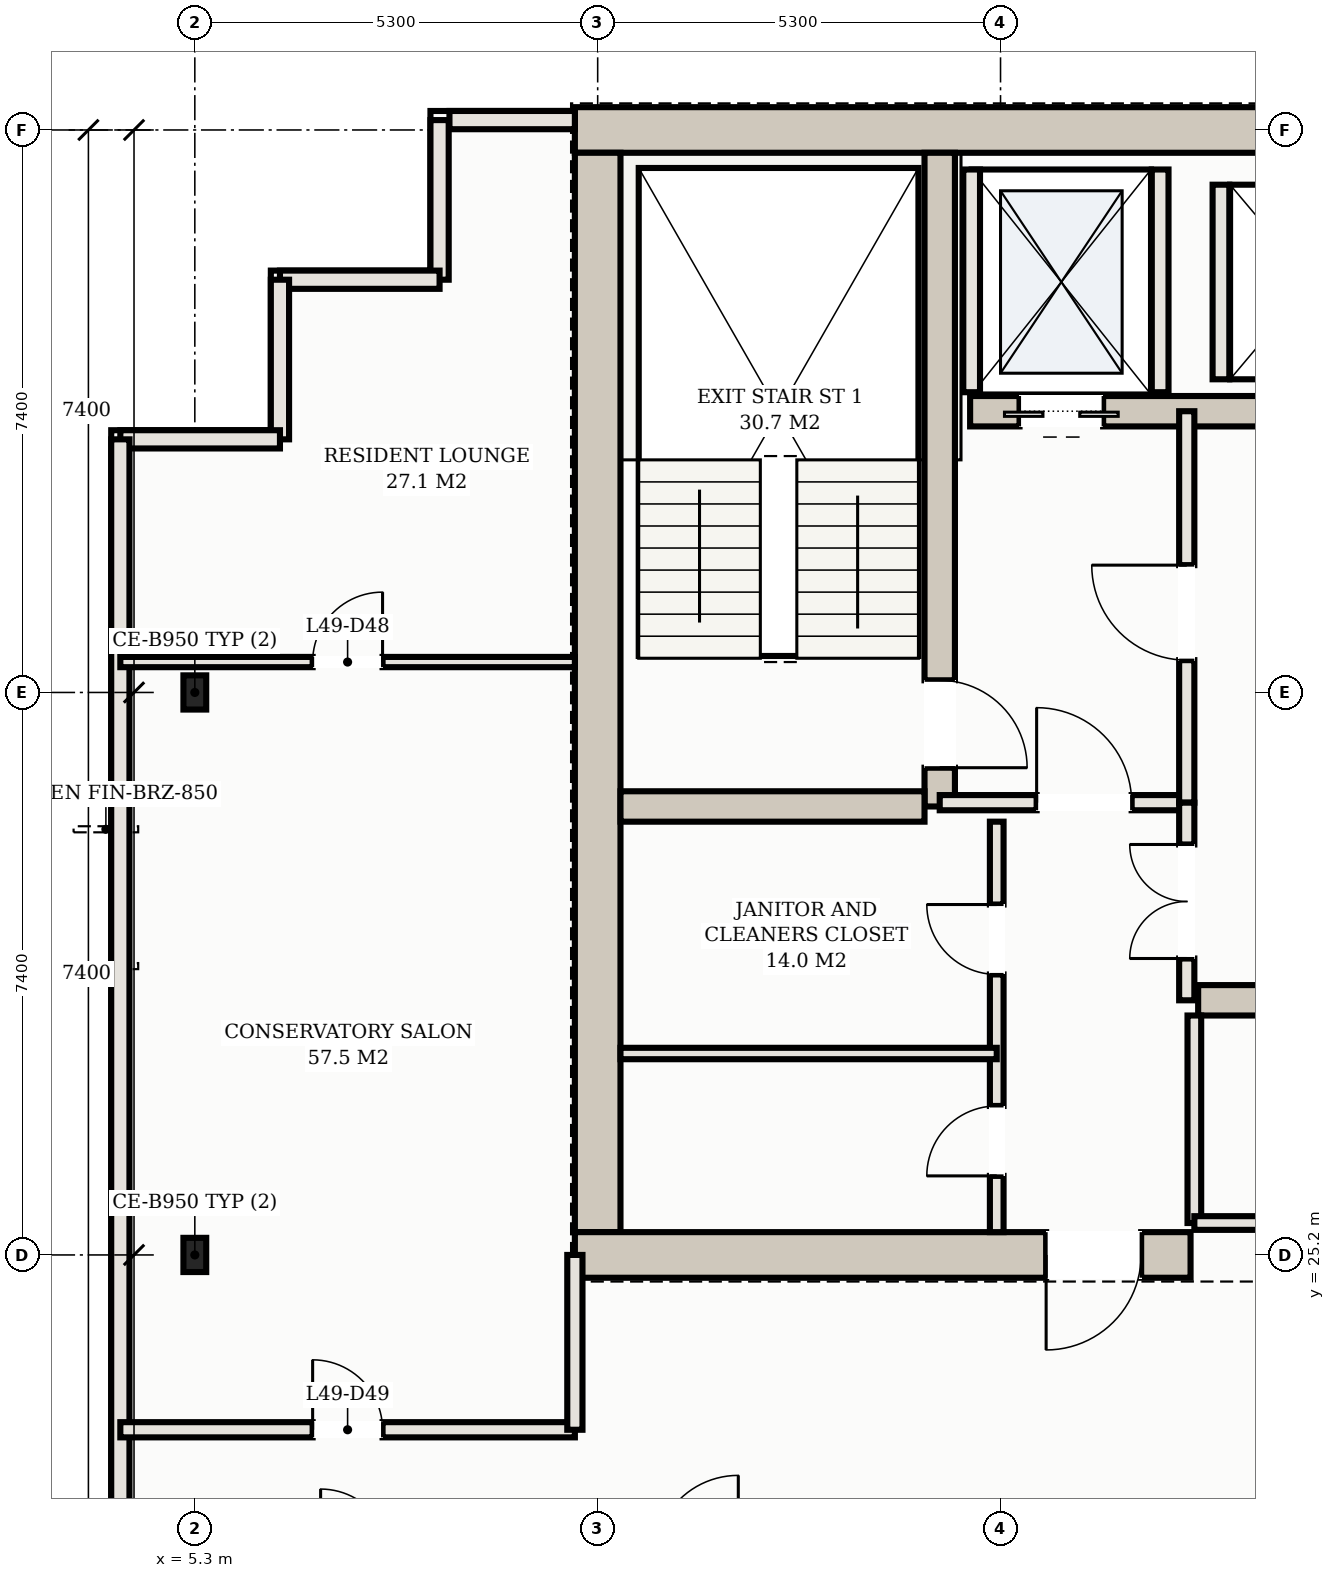
"""IFC4 building model, lengths in metres.
Left out: names, types, materials, properties, quantities, classifications, styles, units other than length and angle.
Written with IfcOpenShell. Run it as: python <this file> out.ifc"""

import sys

from ifc_helpers import new_model, si_unit, direction, frame, frame_2d, origin, origin_2d, place, context, subcontext, project, spatial, rectangle, hollow_rectangle, extrude, element, fill, save


model = new_model("IFC4")
c1 = context("Model", 3, precision=1e-05, world=origin(), true_north=direction((0.0, 1.0)))
c2 = subcontext(c1, "Body", "Model", "MODEL_VIEW")
j1 = project(units=[si_unit("LENGTHUNIT", "METRE"), si_unit("PLANEANGLEUNIT", "RADIAN")], contexts=[c1])
p1 = place(None, origin())
s1 = spatial("IfcSite", under=j1, at=p1, CompositionType="ELEMENT")
p2 = place(p1, origin())
s2 = spatial("IfcBuilding", under=s1, at=p2, CompositionType="ELEMENT")
p3 = place(p2, frame((0.0, 0.0, 178.8)))
s3 = spatial("IfcBuildingStorey", under=s2, at=p3, CompositionType="ELEMENT", Elevation=178.8)
p4 = place(p3, frame((10.3, 40.0, 0.0), z_axis=(0.0, 0.0, 1.0), x_axis=(1.0, 0.0, 0.0)))
e1 = element("IfcWall", 1, at=p4, inside=s3, PredefinedType="SHEAR", context=c2, shape_type="SweptSolid", body=[
    extrude(rectangle(XDim=32.4, YDim=0.6, at=frame_2d((16.2, 0.0))), origin(), (0.0, 0.0, 1.0), 3.1),
])
p5 = place(p3, frame((10.6, 25.5, 0.0), z_axis=(0.0, 0.0, 1.0), x_axis=(0.0, 1.0, 0.0)))
e2 = element("IfcWall", 2, at=p5, inside=s3, PredefinedType="SHEAR", context=c2, shape_type="SweptSolid", body=[
    extrude(rectangle(XDim=14.2, YDim=0.6, at=frame_2d((7.1, 0.0))), origin(), (0.0, 0.0, 1.0), 3.1),
])
p6 = place(p3, frame((10.3, 25.2, 0.0), z_axis=(0.0, 0.0, 1.0), x_axis=(1.0, 0.0, 0.0)))
e3 = element("IfcWall", 3, at=p6, inside=s3, PredefinedType="SHEAR", context=c2, shape_type="SweptSolid", body=[
    extrude(rectangle(XDim=8.1, YDim=0.6, at=frame_2d((4.05, 0.0))), origin(), (0.0, 0.0, 1.0), 3.1),
])
p7 = place(p6, frame((6.2, 0.0, 0.0)))
e4 = element("IfcOpeningElement", 4, at=p7, cuts=e3, PredefinedType="OPENING", context=c2, shape_type="SweptSolid", body=[
    extrude(rectangle(XDim=1.25, YDim=2.2, at=frame_2d((0.625, 1.1))), frame((0.0, 0.31, 0.0), z_axis=(0.0, -1.0, 0.0), x_axis=(1.0, 0.0, 0.0)), (0.0, 0.0, 1.0), 0.62),
])
p8 = place(p3, frame((15.1, 31.1, 0.0), z_axis=(0.0, 0.0, 1.0), x_axis=(0.0, 1.0, 0.0)))
e5 = element("IfcWall", 5, at=p8, inside=s3, PredefinedType="SHEAR", context=c2, shape_type="SweptSolid", body=[
    extrude(rectangle(XDim=8.6, YDim=0.4, at=frame_2d((4.3, 0.0))), origin(), (0.0, 0.0, 1.0), 3.1),
])
p9 = place(p8, frame((0.51, 0.0, 0.0)))
e6 = element("IfcOpeningElement", 6, at=p9, cuts=e5, PredefinedType="OPENING", context=c2, shape_type="SweptSolid", body=[
    extrude(rectangle(XDim=1.15, YDim=2.2, at=frame_2d((0.575, 1.1))), frame((0.0, 0.21, 0.0), z_axis=(0.0, -1.0, 0.0), x_axis=(1.0, 0.0, 0.0)), (0.0, 0.0, 1.0), 0.42),
])
p10 = place(p3, frame((10.9, 31.1, 0.0), z_axis=(0.0, 0.0, 1.0), x_axis=(1.0, 0.0, 0.0)))
e7 = element("IfcWall", 7, at=p10, inside=s3, PredefinedType="SHEAR", context=c2, shape_type="SweptSolid", body=[
    extrude(rectangle(XDim=4.0, YDim=0.4, at=frame_2d((2.0, 0.0))), origin(), (0.0, 0.0, 1.0), 3.1),
])
p11 = place(p3, frame((15.5, 36.3, 0.0), z_axis=(0.0, 0.0, 1.0), x_axis=(1.0, 0.0, 0.0)))
e8 = element("IfcWall", 8, at=p11, inside=s3, PredefinedType="SHEAR", context=c2, shape_type="SweptSolid", body=[
    extrude(rectangle(XDim=22.0, YDim=0.4, at=frame_2d((11.0, 0.0))), origin(), (0.0, 0.0, 1.0), 3.1),
])
p12 = place(p11, frame((0.65, 0.0, 0.0)))
e9 = element("IfcOpeningElement", 9, at=p12, cuts=e8, PredefinedType="OPENING", context=c2, shape_type="SweptSolid", body=[
    extrude(rectangle(XDim=1.1, YDim=2.15, at=frame_2d((0.55, 1.075))), frame((0.0, 0.21, 0.0), z_axis=(0.0, -1.0, 0.0), x_axis=(1.0, 0.0, 0.0)), (0.0, 0.0, 1.0), 0.42),
])
p13 = place(p11, frame((20.25, 0.0, 0.0)))
e10 = element("IfcOpeningElement", 10, at=p13, cuts=e8, PredefinedType="OPENING", context=c2, shape_type="SweptSolid", body=[
    extrude(rectangle(XDim=1.1, YDim=2.15, at=frame_2d((0.55, 1.075))), frame((0.0, 0.21, 0.0), z_axis=(0.0, -1.0, 0.0), x_axis=(1.0, 0.0, 0.0)), (0.0, 0.0, 1.0), 0.42),
])
p14 = place(p11, frame((17.05, 0.0, 0.0)))
e11 = element("IfcOpeningElement", 11, at=p14, cuts=e8, PredefinedType="OPENING", context=c2, shape_type="SweptSolid", body=[
    extrude(rectangle(XDim=1.3, YDim=2.2, at=frame_2d((0.65, 1.1))), frame((0.0, 0.21, 0.0), z_axis=(0.0, -1.0, 0.0), x_axis=(1.0, 0.0, 0.0)), (0.0, 0.0, 1.0), 0.42),
])
p15 = place(p3, frame((18.5, 28.55, 0.0), z_axis=(0.0, 0.0, 1.0), x_axis=(1.0, 0.0, 0.0)))
e12 = element("IfcWall", 12, at=p15, inside=s3, PredefinedType="SHEAR", context=c2, shape_type="SweptSolid", body=[
    extrude(rectangle(XDim=16.0, YDim=0.4, at=frame_2d((8.0, 0.0))), origin(), (0.0, 0.0, 1.0), 3.1),
])
p16 = place(p15, frame((8.95, 0.0, 0.0)))
e13 = element("IfcOpeningElement", 13, at=p16, cuts=e12, PredefinedType="OPENING", context=c2, shape_type="SweptSolid", body=[
    extrude(rectangle(XDim=1.1, YDim=2.15, at=frame_2d((0.55, 1.075))), frame((0.0, 0.21, 0.0), z_axis=(0.0, -1.0, 0.0), x_axis=(1.0, 0.0, 0.0)), (0.0, 0.0, 1.0), 0.42),
])
p17 = place(p15, frame((11.55, 0.0, 0.0)))
e14 = element("IfcOpeningElement", 14, at=p17, cuts=e12, PredefinedType="OPENING", context=c2, shape_type="SweptSolid", body=[
    extrude(rectangle(XDim=1.1, YDim=2.15, at=frame_2d((0.55, 1.075))), frame((0.0, 0.21, 0.0), z_axis=(0.0, -1.0, 0.0), x_axis=(1.0, 0.0, 0.0)), (0.0, 0.0, 1.0), 0.42),
])
p18 = place(p15, frame((14.15, 0.0, 0.0)))
e15 = element("IfcOpeningElement", 15, at=p18, cuts=e12, PredefinedType="OPENING", context=c2, shape_type="SweptSolid", body=[
    extrude(rectangle(XDim=1.1, YDim=2.15, at=frame_2d((0.55, 1.075))), frame((0.0, 0.21, 0.0), z_axis=(0.0, -1.0, 0.0), x_axis=(1.0, 0.0, 0.0)), (0.0, 0.0, 1.0), 0.42),
])
for number, where, z_axis, x_axis in (
    (16, (5.3, 25.2, 0.0), (0.0, 0.0, 1.0), (1.0, 0.0, 0.0)),
    (17, (5.3, 32.6, 0.0), (0.0, 0.0, 1.0), (1.0, 0.0, 0.0)),
):
    element("IfcColumn", number, at=place(p3, frame(where, z_axis=z_axis, x_axis=x_axis)), inside=s3, PredefinedType="COLUMN", context=c2, shape_type="SweptSolid", body=[
        extrude(hollow_rectangle(XDim=0.3, YDim=0.45, WallThickness=0.016, at=origin_2d()), origin(), (0.0, 0.0, 1.0), 3.3),
    ])
for number, where, z_axis, x_axis in (
    (18, (15.52, 36.55, 0.0), (0.0, 0.0, 1.0), (0.0, 1.0, 0.0)),
    (19, (18.0, 36.55, 0.0), (0.0, 0.0, 1.0), (0.0, 1.0, 0.0)),
):
    element("IfcWall", number, at=place(p3, frame(where, z_axis=z_axis, x_axis=x_axis)), inside=s3, PredefinedType="SOLIDWALL", context=c2, shape_type="SweptSolid", body=[
        extrude(rectangle(XDim=2.93, YDim=0.22, at=frame_2d((1.465, 0.0))), origin(), (0.0, 0.0, 1.0), 3.1),
    ])
p19 = place(p3, frame((18.8, 36.72, 0.0), z_axis=(0.0, 0.0, 1.0), x_axis=(0.0, 1.0, 0.0)))
e20 = element("IfcWall", 20, at=p19, inside=s3, PredefinedType="SOLIDWALL", context=c2, shape_type="SweptSolid", body=[
    extrude(rectangle(XDim=2.56, YDim=0.22, at=frame_2d((1.28, 0.0))), origin(), (0.0, 0.0, 1.0), 3.1),
])
p20 = place(p3, frame((10.3, 40.13, 0.0), z_axis=(0.0, 0.0, 1.0), x_axis=(-1.0, 0.0, 0.0)))
e21 = element("IfcWall", 21, at=p20, inside=s3, PredefinedType="SOLIDWALL", context=c2, shape_type="SweptSolid", body=[
    extrude(rectangle(XDim=1.65, YDim=0.24, at=frame_2d((0.825, 0.0))), origin(), (0.0, 0.0, 1.0), 3.1),
])
p21 = place(p3, frame((8.52, 40.13, 0.0), z_axis=(0.0, 0.0, 1.0), x_axis=(0.0, -1.0, 0.0)))
e22 = element("IfcWall", 22, at=p21, inside=s3, PredefinedType="SOLIDWALL", context=c2, shape_type="SweptSolid", body=[
    extrude(rectangle(XDim=2.1, YDim=0.24, at=frame_2d((1.05, 0.0))), origin(), (0.0, 0.0, 1.0), 3.1),
])
for number, where, z_axis, x_axis in (
    (23, (8.52, 38.03, 0.0), (0.0, 0.0, 1.0), (-1.0, 0.0, 0.0)),
    (24, (6.42, 38.03, 0.0), (0.0, 0.0, 1.0), (0.0, -1.0, 0.0)),
):
    element("IfcWall", number, at=place(p3, frame(where, z_axis=z_axis, x_axis=x_axis)), inside=s3, PredefinedType="SOLIDWALL", context=c2, shape_type="SweptSolid", body=[
        extrude(rectangle(XDim=2.1, YDim=0.24, at=frame_2d((1.05, 0.0))), origin(), (0.0, 0.0, 1.0), 3.1),
    ])
p22 = place(p3, frame((6.42, 35.93, 0.0), z_axis=(0.0, 0.0, 1.0), x_axis=(-1.0, 0.0, 0.0)))
e25 = element("IfcWall", 25, at=p22, inside=s3, PredefinedType="SOLIDWALL", context=c2, shape_type="SweptSolid", body=[
    extrude(rectangle(XDim=2.1, YDim=0.24, at=frame_2d((1.05, 0.0))), origin(), (0.0, 0.0, 1.0), 3.1),
])
p23 = place(p3, frame((4.32, 35.93, 0.0), z_axis=(0.0, 0.0, 1.0), x_axis=(0.0, -1.0, 0.0)))
e26 = element("IfcWall", 26, at=p23, inside=s3, PredefinedType="SOLIDWALL", context=c2, shape_type="SweptSolid", body=[
    extrude(rectangle(XDim=27.41, YDim=0.24, at=frame_2d((13.705, 0.0))), origin(), (0.0, 0.0, 1.0), 3.1),
])
p24 = place(p3, frame((15.1, 31.15, 0.0), z_axis=(0.0, 0.0, 1.0), x_axis=(1.0, 0.0, 0.0)))
e27 = element("IfcWall", 27, at=p24, inside=s3, PredefinedType="PARTITIONING", context=c2, shape_type="SweptSolid", body=[
    extrude(rectangle(XDim=3.25, YDim=0.2, at=frame_2d((1.625, 0.0))), origin(), (0.0, 0.0, 1.0), 2.38),
])
p25 = place(p24, frame((1.275, 0.0, 0.0)))
e28 = element("IfcOpeningElement", 28, at=p25, cuts=e27, PredefinedType="OPENING", context=c2, shape_type="SweptSolid", body=[
    extrude(rectangle(XDim=1.25, YDim=2.2, at=frame_2d((0.625, 1.1))), frame((0.0, 0.11, 0.0), z_axis=(0.0, -1.0, 0.0), x_axis=(1.0, 0.0, 0.0)), (0.0, 0.0, 1.0), 0.22),
])
p26 = place(p3, frame((18.35, 31.15, 0.0), z_axis=(0.0, 0.0, 1.0), x_axis=(0.0, 1.0, 0.0)))
e29 = element("IfcWall", 29, at=p26, inside=s3, PredefinedType="PARTITIONING", context=c2, shape_type="SweptSolid", body=[
    extrude(rectangle(XDim=5.15, YDim=0.2, at=frame_2d((2.575, 0.0))), origin(), (0.0, 0.0, 1.0), 2.38),
])
p27 = place(p26, frame((1.875, 0.0, 0.0)))
e30 = element("IfcOpeningElement", 30, at=p27, cuts=e29, PredefinedType="OPENING", context=c2, shape_type="SweptSolid", body=[
    extrude(rectangle(XDim=1.25, YDim=2.2, at=frame_2d((0.625, 1.1))), frame((0.0, 0.11, 0.0), z_axis=(0.0, -1.0, 0.0), x_axis=(1.0, 0.0, 0.0)), (0.0, 0.0, 1.0), 0.22),
])
p28 = place(p3, frame((15.85, 25.5, 0.0), z_axis=(0.0, 0.0, 1.0), x_axis=(0.0, 1.0, 0.0)))
e31 = element("IfcWall", 31, at=p28, inside=s3, PredefinedType="PARTITIONING", context=c2, shape_type="SweptSolid", body=[
    extrude(rectangle(XDim=5.4, YDim=0.18, at=frame_2d((2.7, 0.0))), origin(), (0.0, 0.0, 1.0), 2.38),
])
p29 = place(p28, frame((0.74, 0.0, 0.0)))
e32 = element("IfcOpeningElement", 32, at=p29, cuts=e31, PredefinedType="OPENING", context=c2, shape_type="SweptSolid", body=[
    extrude(rectangle(XDim=0.92, YDim=2.15, at=frame_2d((0.46, 1.075))), frame((0.0, 0.1, 0.0), z_axis=(0.0, -1.0, 0.0), x_axis=(1.0, 0.0, 0.0)), (0.0, 0.0, 1.0), 0.2),
])
p30 = place(p28, frame((3.39, 0.0, 0.0)))
e33 = element("IfcOpeningElement", 33, at=p30, cuts=e31, PredefinedType="OPENING", context=c2, shape_type="SweptSolid", body=[
    extrude(rectangle(XDim=0.92, YDim=2.15, at=frame_2d((0.46, 1.075))), frame((0.0, 0.1, 0.0), z_axis=(0.0, -1.0, 0.0), x_axis=(1.0, 0.0, 0.0)), (0.0, 0.0, 1.0), 0.2),
])
p31 = place(p3, frame((10.9, 27.85, 0.0), z_axis=(0.0, 0.0, 1.0), x_axis=(1.0, 0.0, 0.0)))
e34 = element("IfcWall", 34, at=p31, inside=s3, PredefinedType="PARTITIONING", context=c2, shape_type="SweptSolid", body=[
    extrude(rectangle(XDim=4.95, YDim=0.15, at=frame_2d((2.475, 0.0))), origin(), (0.0, 0.0, 1.0), 2.38),
])
p32 = place(p3, frame((18.35, 28.55, 0.0), z_axis=(0.0, 0.0, 1.0), x_axis=(0.0, 1.0, 0.0)))
e35 = element("IfcWall", 35, at=p32, inside=s3, PredefinedType="PARTITIONING", context=c2, shape_type="SweptSolid", body=[
    extrude(rectangle(XDim=2.6, YDim=0.2, at=frame_2d((1.3, 0.0))), origin(), (0.0, 0.0, 1.0), 2.38),
])
p33 = place(p32, frame((0.55, 0.0, 0.0)))
e36 = element("IfcOpeningElement", 36, at=p33, cuts=e35, PredefinedType="OPENING", context=c2, shape_type="SweptSolid", body=[
    extrude(rectangle(XDim=1.5, YDim=2.25, at=frame_2d((0.75, 1.125))), frame((0.0, 0.11, 0.0), z_axis=(0.0, -1.0, 0.0), x_axis=(1.0, 0.0, 0.0)), (0.0, 0.0, 1.0), 0.22),
])
p34 = place(p3, frame((18.45, 25.62, 0.0), z_axis=(0.0, 0.0, 1.0), x_axis=(0.0, 1.0, 0.0)))
e37 = element("IfcWall", 37, at=p34, inside=s3, PredefinedType="PARTITIONING", context=c2, shape_type="SweptSolid", body=[
    extrude(rectangle(XDim=2.73, YDim=0.18, at=frame_2d((1.365, 0.0))), origin(), (0.0, 0.0, 1.0), 2.38),
])
p35 = place(p3, frame((18.45, 25.62, 0.0), z_axis=(0.0, 0.0, 1.0), x_axis=(1.0, 0.0, 0.0)))
e38 = element("IfcWall", 38, at=p35, inside=s3, PredefinedType="PARTITIONING", context=c2, shape_type="SweptSolid", body=[
    extrude(rectangle(XDim=7.9, YDim=0.18, at=frame_2d((3.95, 0.0))), origin(), (0.0, 0.0, 1.0), 2.38),
])
p36 = place(p35, frame((3.34, 0.0, 0.0)))
e39 = element("IfcOpeningElement", 39, at=p36, cuts=e38, PredefinedType="OPENING", context=c2, shape_type="SweptSolid", body=[
    extrude(rectangle(XDim=0.92, YDim=2.15, at=frame_2d((0.46, 1.075))), frame((0.0, 0.1, 0.0), z_axis=(0.0, -1.0, 0.0), x_axis=(1.0, 0.0, 0.0)), (0.0, 0.0, 1.0), 0.2),
])
p37 = place(p3, frame((4.32, 22.9, 0.0), z_axis=(0.0, 0.0, 1.0), x_axis=(1.0, 0.0, 0.0)))
e40 = element("IfcWall", 40, at=p37, inside=s3, PredefinedType="PARTITIONING", context=c2, shape_type="SweptSolid", body=[
    extrude(rectangle(XDim=5.98, YDim=0.2, at=frame_2d((2.99, 0.0))), origin(), (0.0, 0.0, 1.0), 2.38),
])
p38 = place(p37, frame((2.53, 0.0, 0.0)))
e41 = element("IfcOpeningElement", 41, at=p38, cuts=e40, PredefinedType="OPENING", context=c2, shape_type="SweptSolid", body=[
    extrude(rectangle(XDim=0.92, YDim=2.15, at=frame_2d((0.46, 1.075))), frame((0.0, 0.11, 0.0), z_axis=(0.0, -1.0, 0.0), x_axis=(1.0, 0.0, 0.0)), (0.0, 0.0, 1.0), 0.22),
])
p39 = place(p3, frame((10.3, 22.9, 0.0), z_axis=(0.0, 0.0, 1.0), x_axis=(0.0, 1.0, 0.0)))
e42 = element("IfcWall", 42, at=p39, inside=s3, PredefinedType="PARTITIONING", context=c2, shape_type="SweptSolid", body=[
    extrude(rectangle(XDim=2.3, YDim=0.2, at=frame_2d((1.15, 0.0))), origin(), (0.0, 0.0, 1.0), 2.38),
])
p40 = place(p3, frame((4.32, 33.0, 0.0), z_axis=(0.0, 0.0, 1.0), x_axis=(1.0, 0.0, 0.0)))
e43 = element("IfcWall", 43, at=p40, inside=s3, PredefinedType="PARTITIONING", context=c2, shape_type="SweptSolid", body=[
    extrude(rectangle(XDim=5.98, YDim=0.135, at=frame_2d((2.99, 0.0))), origin(), (0.0, 0.0, 1.0), 2.38),
])
p41 = place(p40, frame((2.53, 0.0, 0.0)))
e44 = element("IfcOpeningElement", 44, at=p41, cuts=e43, PredefinedType="OPENING", context=c2, shape_type="SweptSolid", body=[
    extrude(rectangle(XDim=0.92, YDim=2.15, at=frame_2d((0.46, 1.075))), frame((0.0, 0.078, 0.0), z_axis=(0.0, -1.0, 0.0), x_axis=(1.0, 0.0, 0.0)), (0.0, 0.0, 1.0), 0.155),
])
p42 = place(p12, frame((1.1, 0.0, 0.0), z_axis=(0.0, 0.0, 1.0), x_axis=(-1.0, 0.0, 0.0)))
e45 = element("IfcDoor", 45, at=p42, inside=s3, OperationType="DOUBLE_DOOR_SLIDING", PredefinedType="DOOR", context=c2, shape_type="SweptSolid", body=[
    extrude(rectangle(XDim=1.1, YDim=2.15, at=frame_2d((0.55, 1.075))), frame((0.0, 0.025, 0.0), z_axis=(0.0, -1.0, 0.0), x_axis=(1.0, 0.0, 0.0)), (0.0, 0.0, 1.0), 0.05),
])
fill(e9, e45)
p43 = place(p7, frame((1.25, 0.0, 0.0), z_axis=(0.0, 0.0, 1.0), x_axis=(-1.0, 0.0, 0.0)))
e46 = element("IfcDoor", 46, at=p43, inside=s3, OperationType="SINGLE_SWING_RIGHT", PredefinedType="DOOR", context=c2, shape_type="SweptSolid", body=[
    extrude(rectangle(XDim=1.25, YDim=2.2, at=frame_2d((0.625, 1.1))), frame((0.0, 0.025, 0.0), z_axis=(0.0, -1.0, 0.0), x_axis=(1.0, 0.0, 0.0)), (0.0, 0.0, 1.0), 0.05),
])
fill(e4, e46)
p44 = place(p25, origin())
e47 = element("IfcDoor", 47, at=p44, inside=s3, OperationType="SINGLE_SWING_LEFT", PredefinedType="DOOR", context=c2, shape_type="SweptSolid", body=[
    extrude(rectangle(XDim=1.25, YDim=2.2, at=frame_2d((0.625, 1.1))), frame((0.0, 0.025, 0.0), z_axis=(0.0, -1.0, 0.0), x_axis=(1.0, 0.0, 0.0)), (0.0, 0.0, 1.0), 0.05),
])
fill(e28, e47)
p45 = place(p27, origin())
e48 = element("IfcDoor", 48, at=p45, inside=s3, OperationType="SINGLE_SWING_RIGHT", PredefinedType="DOOR", context=c2, shape_type="SweptSolid", body=[
    extrude(rectangle(XDim=1.25, YDim=2.2, at=frame_2d((0.625, 1.1))), frame((0.0, 0.025, 0.0), z_axis=(0.0, -1.0, 0.0), x_axis=(1.0, 0.0, 0.0)), (0.0, 0.0, 1.0), 0.05),
])
fill(e30, e48)
p46 = place(p9, frame((1.15, 0.0, 0.0), z_axis=(0.0, 0.0, 1.0), x_axis=(-1.0, 0.0, 0.0)))
e49 = element("IfcDoor", 49, at=p46, inside=s3, OperationType="SINGLE_SWING_RIGHT", PredefinedType="DOOR", context=c2, shape_type="SweptSolid", body=[
    extrude(rectangle(XDim=1.15, YDim=2.2, at=frame_2d((0.575, 1.1))), frame((0.0, 0.025, 0.0), z_axis=(0.0, -1.0, 0.0), x_axis=(1.0, 0.0, 0.0)), (0.0, 0.0, 1.0), 0.05),
])
fill(e6, e49)
p47 = place(p29, origin())
e50 = element("IfcDoor", 50, at=p47, inside=s3, OperationType="SINGLE_SWING_LEFT", PredefinedType="DOOR", context=c2, shape_type="SweptSolid", body=[
    extrude(rectangle(XDim=0.92, YDim=2.15, at=frame_2d((0.46, 1.075))), frame((0.0, 0.025, 0.0), z_axis=(0.0, -1.0, 0.0), x_axis=(1.0, 0.0, 0.0)), (0.0, 0.0, 1.0), 0.05),
])
fill(e32, e50)
p48 = place(p30, origin())
e51 = element("IfcDoor", 51, at=p48, inside=s3, OperationType="SINGLE_SWING_RIGHT", PredefinedType="DOOR", context=c2, shape_type="SweptSolid", body=[
    extrude(rectangle(XDim=0.92, YDim=2.15, at=frame_2d((0.46, 1.075))), frame((0.0, 0.025, 0.0), z_axis=(0.0, -1.0, 0.0), x_axis=(1.0, 0.0, 0.0)), (0.0, 0.0, 1.0), 0.05),
])
fill(e33, e51)
p49 = place(p33, origin())
e52 = element("IfcDoor", 52, at=p49, inside=s3, OperationType="DOUBLE_DOOR_SINGLE_SWING", PredefinedType="DOOR", context=c2, shape_type="SweptSolid", body=[
    extrude(rectangle(XDim=1.5, YDim=2.25, at=frame_2d((0.75, 1.125))), frame((0.0, 0.025, 0.0), z_axis=(0.0, -1.0, 0.0), x_axis=(1.0, 0.0, 0.0)), (0.0, 0.0, 1.0), 0.05),
])
fill(e36, e52)
p50 = place(p41, origin())
e53 = element("IfcDoor", 53, at=p50, inside=s3, OperationType="SINGLE_SWING_RIGHT", PredefinedType="DOOR", context=c2, shape_type="SweptSolid", body=[
    extrude(rectangle(XDim=0.92, YDim=2.15, at=frame_2d((0.46, 1.075))), frame((0.0, 0.025, 0.0), z_axis=(0.0, -1.0, 0.0), x_axis=(1.0, 0.0, 0.0)), (0.0, 0.0, 1.0), 0.05),
])
fill(e44, e53)
p51 = place(p38, origin())
e54 = element("IfcDoor", 54, at=p51, inside=s3, OperationType="SINGLE_SWING_LEFT", PredefinedType="DOOR", context=c2, shape_type="SweptSolid", body=[
    extrude(rectangle(XDim=0.92, YDim=2.15, at=frame_2d((0.46, 1.075))), frame((0.0, 0.025, 0.0), z_axis=(0.0, -1.0, 0.0), x_axis=(1.0, 0.0, 0.0)), (0.0, 0.0, 1.0), 0.05),
])
fill(e41, e54)
save(model, sys.argv[1])
